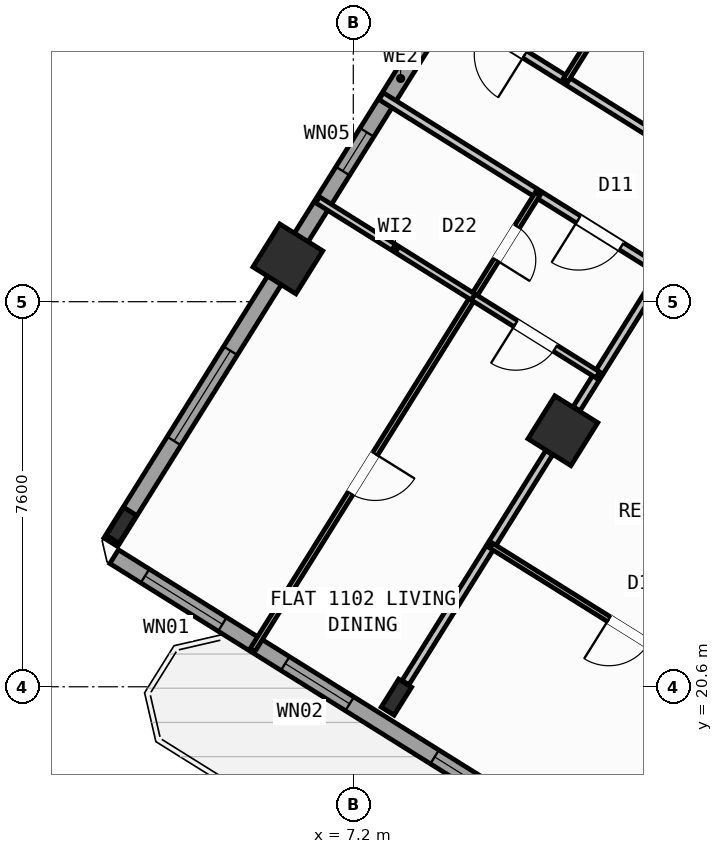
"""IFC4 building model, lengths in metres.
Left out: names, types, materials, properties, quantities, classifications, styles, units other than length and angle.
Written with IfcOpenShell. Run it as: python <this file> out.ifc"""

import sys

from ifc_helpers import new_model, si_unit, direction, frame, frame_2d, origin, origin_2d, place, context, subcontext, project, spatial, rectangle, hollow_rectangle, i_section, extrude, source, transform, mapped, element, fill, save


model = new_model("IFC4")
c1 = context("Model", 3, precision=1e-05, world=origin(), true_north=direction((0.0, 1.0)))
c2 = subcontext(c1, "Body", "Model", "MODEL_VIEW")
j1 = project(units=[si_unit("LENGTHUNIT", "METRE"), si_unit("PLANEANGLEUNIT", "RADIAN")], contexts=[c1])
p1 = place(None, origin())
s1 = spatial("IfcSite", under=j1, at=p1, CompositionType="ELEMENT")
p2 = place(p1, origin())
s2 = spatial("IfcBuilding", under=s1, at=p2, CompositionType="ELEMENT")
p3 = place(p2, frame((0.0, 0.0, 45.6)))
s3 = spatial("IfcBuildingStorey", under=s2, at=p3, CompositionType="ELEMENT", Elevation=45.6)
m1 = source(origin(), c2, "Body", "SweptSolid", [
    extrude(hollow_rectangle(XDim=1.0, YDim=1.0, WallThickness=0.04, at=origin_2d()), origin(), (0.0, 0.0, 1.0), 3.6),
])
p4 = place(p3, frame((11.336, 25.653, 0.0), z_axis=(0.0, 0.0, 1.0), x_axis=(-0.848048096156, 0.529919264233, 0.0)))
e1 = element("IfcColumn", 1, at=p4, inside=s3, PredefinedType="COLUMN", context=c2, shape_type="MappedRepresentation", body=[
    mapped(m1, transform((0.0, 0.0, 0.0), scale=1.0)),
])
m2 = source(origin(), c2, "Body", "SweptSolid", [
    extrude(i_section(OverallWidth=0.3, OverallDepth=0.65, WebThickness=0.016, FlangeThickness=0.031, at=origin_2d()), origin(), (0.0, 0.0, 1.0), 3.6),
])
p5 = place(p3, frame((8.051, 20.395, 0.0), z_axis=(0.0, 0.0, 1.0), x_axis=(-0.848048096156, 0.529919264233, 0.0)))
e2 = element("IfcColumn", 2, at=p5, inside=s3, PredefinedType="COLUMN", context=c2, shape_type="MappedRepresentation", body=[
    mapped(m2, transform((0.0, 0.0, 0.0), scale=1.0)),
])
p6 = place(p3, frame((5.909, 29.044, 0.0), z_axis=(0.0, 0.0, 1.0), x_axis=(-0.848048096156, 0.529919264233, 0.0)))
e3 = element("IfcColumn", 3, at=p6, inside=s3, PredefinedType="COLUMN", context=c2, shape_type="MappedRepresentation", body=[
    mapped(m1, transform((0.0, 0.0, 0.0), scale=1.0)),
])
p7 = place(p3, frame((2.623, 23.786, 0.0), z_axis=(0.0, 0.0, 1.0), x_axis=(-0.848048096156, 0.529919264233, 0.0)))
e4 = element("IfcColumn", 4, at=p7, inside=s3, PredefinedType="COLUMN", context=c2, shape_type="MappedRepresentation", body=[
    mapped(m2, transform((0.0, 0.0, 0.0), scale=1.0)),
])
p8 = place(p3, frame((29.268, 6.429, 0.0), z_axis=(0.0, 0.0, 1.0), x_axis=(-0.848049971435, 0.529916263149, 0.0)))
e5 = element("IfcWall", 5, at=p8, inside=s3, PredefinedType="STANDARD", context=c2, shape_type="SweptSolid", body=[
    extrude(rectangle(XDim=31.588, YDim=0.32, at=frame_2d((15.794, 0.0))), origin(), (0.0, 0.0, 1.0), 3.35),
])
p9 = place(p8, frame((16.362, 0.0, 0.0)))
e6 = element("IfcOpeningElement", 6, at=p9, cuts=e5, PredefinedType="OPENING", context=c2, shape_type="SweptSolid", body=[
    extrude(rectangle(XDim=1.2, YDim=2.15, at=frame_2d((0.6, 1.075))), frame((0.0, 0.17, 0.0), z_axis=(0.0, -1.0, 0.0), x_axis=(1.0, 0.0, 0.0)), (0.0, 0.0, 1.0), 0.34),
])
p10 = place(p8, frame((2.989, 0.0, 0.8)))
e7 = element("IfcOpeningElement", 7, at=p10, cuts=e5, PredefinedType="OPENING", context=c2, shape_type="SweptSolid", body=[
    extrude(rectangle(XDim=2.1, YDim=1.55, at=frame_2d((1.05, 0.775))), frame((0.0, 0.17, 0.0), z_axis=(0.0, -1.0, 0.0), x_axis=(1.0, 0.0, 0.0)), (0.0, 0.0, 1.0), 0.34),
])
p11 = place(p8, frame((8.359, 0.0, 0.8)))
e8 = element("IfcOpeningElement", 8, at=p11, cuts=e5, PredefinedType="OPENING", context=c2, shape_type="SweptSolid", body=[
    extrude(rectangle(XDim=2.1, YDim=1.55, at=frame_2d((1.05, 0.775))), frame((0.0, 0.17, 0.0), z_axis=(0.0, -1.0, 0.0), x_axis=(1.0, 0.0, 0.0)), (0.0, 0.0, 1.0), 0.34),
])
p12 = place(p8, frame((13.284, 0.0, 0.95)))
e9 = element("IfcOpeningElement", 9, at=p12, cuts=e5, PredefinedType="OPENING", context=c2, shape_type="SweptSolid", body=[
    extrude(rectangle(XDim=1.2, YDim=1.4, at=frame_2d((0.6, 0.7))), frame((0.0, 0.17, 0.0), z_axis=(0.0, -1.0, 0.0), x_axis=(1.0, 0.0, 0.0)), (0.0, 0.0, 1.0), 0.34),
])
p13 = place(p8, frame((20.259, 0.0, 0.95)))
e10 = element("IfcOpeningElement", 10, at=p13, cuts=e5, PredefinedType="OPENING", context=c2, shape_type="SweptSolid", body=[
    extrude(rectangle(XDim=1.2, YDim=1.4, at=frame_2d((0.6, 0.7))), frame((0.0, 0.17, 0.0), z_axis=(0.0, -1.0, 0.0), x_axis=(1.0, 0.0, 0.0)), (0.0, 0.0, 1.0), 0.34),
])
p14 = place(p8, frame((22.929, 0.0, 0.95)))
e11 = element("IfcOpeningElement", 11, at=p14, cuts=e5, PredefinedType="OPENING", context=c2, shape_type="SweptSolid", body=[
    extrude(rectangle(XDim=1.2, YDim=1.4, at=frame_2d((0.6, 0.7))), frame((0.0, 0.17, 0.0), z_axis=(0.0, -1.0, 0.0), x_axis=(1.0, 0.0, 0.0)), (0.0, 0.0, 1.0), 0.34),
])
p15 = place(p8, frame((26.106, 0.0, 0.85)))
e12 = element("IfcOpeningElement", 12, at=p15, cuts=e5, PredefinedType="OPENING", context=c2, shape_type="SweptSolid", body=[
    extrude(rectangle(XDim=1.5, YDim=1.5, at=frame_2d((0.75, 0.75))), frame((0.0, 0.17, 0.0), z_axis=(0.0, -1.0, 0.0), x_axis=(1.0, 0.0, 0.0)), (0.0, 0.0, 1.0), 0.34),
])
p16 = place(p8, frame((29.068, 0.0, 0.85)))
e13 = element("IfcOpeningElement", 13, at=p16, cuts=e5, PredefinedType="OPENING", context=c2, shape_type="SweptSolid", body=[
    extrude(rectangle(XDim=1.8, YDim=1.5, at=frame_2d((0.9, 0.75))), frame((0.0, 0.17, 0.0), z_axis=(0.0, -1.0, 0.0), x_axis=(1.0, 0.0, 0.0)), (0.0, 0.0, 1.0), 0.34),
])
p17 = place(p3, frame((2.415, 23.452, 0.0), z_axis=(0.0, 0.0, 1.0), x_axis=(0.52991049553, 0.848053575387, 0.0)))
e14 = element("IfcWall", 14, at=p17, inside=s3, PredefinedType="STANDARD", context=c2, shape_type="SweptSolid", body=[
    extrude(rectangle(XDim=21.587, YDim=0.32, at=frame_2d((10.794, 0.0))), origin(), (0.0, 0.0, 1.0), 2.725),
])
p18 = place(p17, frame((2.356, 0.0, 0.8)))
e15 = element("IfcOpeningElement", 15, at=p18, cuts=e14, PredefinedType="OPENING", context=c2, shape_type="SweptSolid", body=[
    extrude(rectangle(XDim=2.1, YDim=1.55, at=frame_2d((1.05, 0.775))), frame((0.0, 0.17, 0.0), z_axis=(0.0, -1.0, 0.0), x_axis=(1.0, 0.0, 0.0)), (0.0, 0.0, 1.0), 0.34),
])
p19 = place(p17, frame((8.639, 0.0, 1.0)))
e16 = element("IfcOpeningElement", 16, at=p19, cuts=e14, PredefinedType="OPENING", context=c2, shape_type="SweptSolid", body=[
    extrude(rectangle(XDim=0.9, YDim=1.25, at=frame_2d((0.45, 0.625))), frame((0.0, 0.17, 0.0), z_axis=(0.0, -1.0, 0.0), x_axis=(1.0, 0.0, 0.0)), (0.0, 0.0, 1.0), 0.34),
])
p20 = place(p17, frame((17.129, 0.0, 0.85)))
e17 = element("IfcOpeningElement", 17, at=p20, cuts=e14, PredefinedType="OPENING", context=c2, shape_type="SweptSolid", body=[
    extrude(rectangle(XDim=1.5, YDim=1.5, at=frame_2d((0.75, 0.75))), frame((0.0, 0.17, 0.0), z_axis=(0.0, -1.0, 0.0), x_axis=(1.0, 0.0, 0.0)), (0.0, 0.0, 1.0), 0.34),
])
p21 = place(p3, frame((23.104, 25.256, 0.0), z_axis=(0.0, 0.0, 1.0), x_axis=(-0.848041752158, 0.529929416617, 0.0)))
e18 = element("IfcWall", 18, at=p21, inside=s3, PredefinedType="PARTITIONING", context=c2, shape_type="SweptSolid", body=[
    extrude(rectangle(XDim=16.73, YDim=0.16, at=frame_2d((8.365, 0.0))), origin(), (0.0, 0.0, 1.0), 3.34),
])
p22 = place(p21, frame((1.395, 0.0, 0.0)))
e19 = element("IfcOpeningElement", 19, at=p22, cuts=e18, PredefinedType="OPENING", context=c2, shape_type="SweptSolid", body=[
    extrude(rectangle(XDim=1.0, YDim=2.1, at=frame_2d((0.5, 1.05))), frame((0.0, 0.09, 0.0), z_axis=(0.0, -1.0, 0.0), x_axis=(1.0, 0.0, 0.0)), (0.0, 0.0, 1.0), 0.18),
])
p23 = place(p21, frame((7.82, 0.0, 0.0)))
e20 = element("IfcOpeningElement", 20, at=p23, cuts=e18, PredefinedType="OPENING", context=c2, shape_type="SweptSolid", body=[
    extrude(rectangle(XDim=1.0, YDim=2.1, at=frame_2d((0.5, 1.05))), frame((0.0, 0.09, 0.0), z_axis=(0.0, -1.0, 0.0), x_axis=(1.0, 0.0, 0.0)), (0.0, 0.0, 1.0), 0.18),
])
p24 = place(p21, frame((14.76, 0.0, 0.0)))
e21 = element("IfcOpeningElement", 21, at=p24, cuts=e18, PredefinedType="OPENING", context=c2, shape_type="SweptSolid", body=[
    extrude(rectangle(XDim=1.0, YDim=2.1, at=frame_2d((0.5, 1.05))), frame((0.0, 0.09, 0.0), z_axis=(0.0, -1.0, 0.0), x_axis=(1.0, 0.0, 0.0)), (0.0, 0.0, 1.0), 0.18),
])
p25 = place(p3, frame((21.938, 23.391, 0.0), z_axis=(0.0, 0.0, 1.0), x_axis=(-0.848045850158, 0.529922858565, 0.0)))
e22 = element("IfcWall", 22, at=p25, inside=s3, PredefinedType="PARTITIONING", context=c2, shape_type="SweptSolid", body=[
    extrude(rectangle(XDim=16.73, YDim=0.16, at=frame_2d((8.365, 0.0))), origin(), (0.0, 0.0, 1.0), 3.34),
])
p26 = place(p25, frame((2.22, 0.0, 0.0)))
e23 = element("IfcOpeningElement", 23, at=p26, cuts=e22, PredefinedType="OPENING", context=c2, shape_type="SweptSolid", body=[
    extrude(rectangle(XDim=0.86, YDim=2.05, at=frame_2d((0.43, 1.025))), frame((0.0, 0.09, 0.0), z_axis=(0.0, -1.0, 0.0), x_axis=(1.0, 0.0, 0.0)), (0.0, 0.0, 1.0), 0.18),
])
p27 = place(p25, frame((6.49, 0.0, 0.0)))
e24 = element("IfcOpeningElement", 24, at=p27, cuts=e22, PredefinedType="OPENING", context=c2, shape_type="SweptSolid", body=[
    extrude(rectangle(XDim=1.0, YDim=2.1, at=frame_2d((0.5, 1.05))), frame((0.0, 0.09, 0.0), z_axis=(0.0, -1.0, 0.0), x_axis=(1.0, 0.0, 0.0)), (0.0, 0.0, 1.0), 0.18),
])
p28 = place(p25, frame((11.14, 0.0, 0.0)))
e25 = element("IfcOpeningElement", 25, at=p28, cuts=e22, PredefinedType="OPENING", context=c2, shape_type="SweptSolid", body=[
    extrude(rectangle(XDim=1.0, YDim=2.1, at=frame_2d((0.5, 1.05))), frame((0.0, 0.09, 0.0), z_axis=(0.0, -1.0, 0.0), x_axis=(1.0, 0.0, 0.0)), (0.0, 0.0, 1.0), 0.18),
])
p29 = place(p3, frame((13.297, 28.791, 0.0), z_axis=(0.0, 0.0, 1.0), x_axis=(-0.529930102756, -0.848041323399, 0.0)))
e26 = element("IfcWall", 26, at=p29, inside=s3, PredefinedType="PARTITIONING", context=c2, shape_type="SweptSolid", body=[
    extrude(rectangle(XDim=3.188, YDim=0.16, at=frame_2d((1.594, 0.0))), origin(), (0.0, 0.0, 1.0), 2.725),
])
p30 = place(p3, frame((11.065, 25.219, 0.0), z_axis=(0.0, 0.0, 1.0), x_axis=(-0.529904608059, -0.848057254175, 0.0)))
e27 = element("IfcWall", 27, at=p30, inside=s3, PredefinedType="PARTITIONING", context=c2, shape_type="SweptSolid", body=[
    extrude(rectangle(XDim=5.351, YDim=0.16, at=frame_2d((2.675, 0.0))), origin(), (0.0, 0.0, 1.0), 2.725),
])
p31 = place(p3, frame((15.348, 19.995, 0.0), z_axis=(0.0, 0.0, 1.0), x_axis=(-0.848056163074, 0.529906354247, 0.0)))
e28 = element("IfcWall", 28, at=p31, inside=s3, PredefinedType="PARTITIONING", context=c2, shape_type="SweptSolid", body=[
    extrude(rectangle(XDim=6.4, YDim=0.11, at=frame_2d((3.2, 0.0))), origin(), (0.0, 0.0, 1.0), 3.34),
])
p32 = place(p31, frame((2.74, 0.0, 0.0)))
e29 = element("IfcOpeningElement", 29, at=p32, cuts=e28, PredefinedType="OPENING", context=c2, shape_type="SweptSolid", body=[
    extrude(rectangle(XDim=0.92, YDim=2.08, at=frame_2d((0.46, 1.04))), frame((0.0, 0.065, 0.0), z_axis=(0.0, -1.0, 0.0), x_axis=(1.0, 0.0, 0.0)), (0.0, 0.0, 1.0), 0.13),
])
p33 = place(p3, frame((10.837, 30.327, 0.0), z_axis=(0.0, 0.0, 1.0), x_axis=(-0.529912148489, -0.848052542525, 0.0)))
e30 = element("IfcWall", 30, at=p33, inside=s3, PredefinedType="PARTITIONING", context=c2, shape_type="SweptSolid", body=[
    extrude(rectangle(XDim=10.62, YDim=0.11, at=frame_2d((5.31, 0.0))), origin(), (0.0, 0.0, 1.0), 3.34),
])
p34 = place(p33, frame((0.76, 0.0, 0.0)))
e31 = element("IfcOpeningElement", 31, at=p34, cuts=e30, PredefinedType="OPENING", context=c2, shape_type="SweptSolid", body=[
    extrude(rectangle(XDim=0.78, YDim=2.05, at=frame_2d((0.39, 1.025))), frame((0.0, 0.065, 0.0), z_axis=(0.0, -1.0, 0.0), x_axis=(1.0, 0.0, 0.0)), (0.0, 0.0, 1.0), 0.13),
])
p35 = place(p33, frame((6.05, 0.0, 0.0)))
e32 = element("IfcOpeningElement", 32, at=p35, cuts=e30, PredefinedType="OPENING", context=c2, shape_type="SweptSolid", body=[
    extrude(rectangle(XDim=0.92, YDim=2.08, at=frame_2d((0.46, 1.04))), frame((0.0, 0.065, 0.0), z_axis=(0.0, -1.0, 0.0), x_axis=(1.0, 0.0, 0.0)), (0.0, 0.0, 1.0), 0.13),
])
p36 = place(p3, frame((12.025, 26.755, 0.0), z_axis=(0.0, 0.0, 1.0), x_axis=(-0.848059786386, 0.529900555496, 0.0)))
e33 = element("IfcWall", 33, at=p36, inside=s3, PredefinedType="PLUMBINGWALL", context=c2, shape_type="SweptSolid", body=[
    extrude(rectangle(XDim=2.9, YDim=0.14, at=frame_2d((1.45, 0.0))), origin(), (0.0, 0.0, 1.0), 3.34),
])
p37 = place(p36, frame((0.99, 0.0, 0.0)))
e34 = element("IfcOpeningElement", 34, at=p37, cuts=e33, PredefinedType="OPENING", context=c2, shape_type="SweptSolid", body=[
    extrude(rectangle(XDim=0.92, YDim=2.08, at=frame_2d((0.46, 1.04))), frame((0.0, 0.08, 0.0), z_axis=(0.0, -1.0, 0.0), x_axis=(1.0, 0.0, 0.0)), (0.0, 0.0, 1.0), 0.16),
])
p38 = place(p3, frame((9.566, 28.292, 0.0), z_axis=(0.0, 0.0, 1.0), x_axis=(-0.848021036626, 0.529962566074, 0.0)))
e35 = element("IfcWall", 35, at=p38, inside=s3, PredefinedType="PLUMBINGWALL", context=c2, shape_type="SweptSolid", body=[
    extrude(rectangle(XDim=3.62, YDim=0.14, at=frame_2d((1.81, 0.0))), origin(), (0.0, 0.0, 1.0), 3.34),
])
p39 = place(p3, frame((16.385, 40.563, 0.0), z_axis=(0.0, 0.0, 1.0), x_axis=(-0.529931378574, -0.848040526156, 0.0)))
e36 = element("IfcWall", 36, at=p39, inside=s3, PredefinedType="PARTITIONING", context=c2, shape_type="SweptSolid", body=[
    extrude(rectangle(XDim=9.42, YDim=0.11, at=frame_2d((4.71, 0.0))), origin(), (0.0, 0.0, 1.0), 3.34),
])
p40 = place(p39, frame((7.78, 0.0, 0.0)))
e37 = element("IfcOpeningElement", 37, at=p40, cuts=e36, PredefinedType="OPENING", context=c2, shape_type="SweptSolid", body=[
    extrude(rectangle(XDim=0.78, YDim=2.05, at=frame_2d((0.39, 1.025))), frame((0.0, 0.065, 0.0), z_axis=(0.0, -1.0, 0.0), x_axis=(1.0, 0.0, 0.0)), (0.0, 0.0, 1.0), 0.13),
])
p41 = place(p39, frame((3.05, 0.0, 0.0)))
e38 = element("IfcOpeningElement", 38, at=p41, cuts=e36, PredefinedType="OPENING", context=c2, shape_type="SweptSolid", body=[
    extrude(rectangle(XDim=0.92, YDim=2.08, at=frame_2d((0.46, 1.04))), frame((0.0, 0.065, 0.0), z_axis=(0.0, -1.0, 0.0), x_axis=(1.0, 0.0, 0.0)), (0.0, 0.0, 1.0), 0.13),
])
p42 = place(p3, frame((15.734, 32.692, 0.0), z_axis=(0.0, 0.0, 1.0), x_axis=(-0.848051346257, 0.52991406295, 0.0)))
e39 = element("IfcWall", 39, at=p42, inside=s3, PredefinedType="PLUMBINGWALL", context=c2, shape_type="SweptSolid", body=[
    extrude(rectangle(XDim=3.62, YDim=0.14, at=frame_2d((1.81, 0.0))), origin(), (0.0, 0.0, 1.0), 3.34),
])
m3 = source(origin(), c2, "Body", "SweptSolid", [
    extrude(rectangle(XDim=1.2, YDim=1.4, at=frame_2d((0.6, 0.7))), frame((0.0, 0.03, 0.0), z_axis=(0.0, -1.0, 0.0), x_axis=(1.0, 0.0, 0.0)), (0.0, 0.0, 1.0), 0.06),
])
p43 = place(p14, origin())
e40 = element("IfcWindow", 40, at=p43, inside=s3, PartitioningType="SINGLE_PANEL", PredefinedType="WINDOW", context=c2, shape_type="MappedRepresentation", body=[
    mapped(m3, transform((0.0, 0.0, 0.0), scale=1.0)),
])
fill(e11, e40)
m4 = source(origin(), c2, "Body", "SweptSolid", [
    extrude(rectangle(XDim=1.5, YDim=1.5, at=frame_2d((0.75, 0.75))), frame((0.0, 0.03, 0.0), z_axis=(0.0, -1.0, 0.0), x_axis=(1.0, 0.0, 0.0)), (0.0, 0.0, 1.0), 0.06),
])
p44 = place(p15, origin())
e41 = element("IfcWindow", 41, at=p44, inside=s3, PartitioningType="SINGLE_PANEL", PredefinedType="WINDOW", context=c2, shape_type="MappedRepresentation", body=[
    mapped(m4, transform((0.0, 0.0, 0.0), scale=1.0)),
])
fill(e12, e41)
m5 = source(origin(), c2, "Body", "SweptSolid", [
    extrude(rectangle(XDim=1.8, YDim=1.5, at=frame_2d((0.9, 0.75))), frame((0.0, 0.03, 0.0), z_axis=(0.0, -1.0, 0.0), x_axis=(1.0, 0.0, 0.0)), (0.0, 0.0, 1.0), 0.06),
])
p45 = place(p16, origin())
e42 = element("IfcWindow", 42, at=p45, inside=s3, PartitioningType="SINGLE_PANEL", PredefinedType="WINDOW", context=c2, shape_type="MappedRepresentation", body=[
    mapped(m5, transform((0.0, 0.0, 0.0), scale=1.0)),
])
fill(e13, e42)
m6 = source(origin(), c2, "Body", "SweptSolid", [
    extrude(rectangle(XDim=2.1, YDim=1.55, at=frame_2d((1.05, 0.775))), frame((0.0, 0.03, 0.0), z_axis=(0.0, -1.0, 0.0), x_axis=(1.0, 0.0, 0.0)), (0.0, 0.0, 1.0), 0.06),
])
p46 = place(p18, origin())
e43 = element("IfcWindow", 43, at=p46, inside=s3, PartitioningType="SINGLE_PANEL", PredefinedType="WINDOW", context=c2, shape_type="MappedRepresentation", body=[
    mapped(m6, transform((0.0, 0.0, 0.0), scale=1.0)),
])
fill(e15, e43)
m7 = source(origin(), c2, "Body", "SweptSolid", [
    extrude(rectangle(XDim=0.9, YDim=1.25, at=frame_2d((0.45, 0.625))), frame((0.0, 0.03, 0.0), z_axis=(0.0, -1.0, 0.0), x_axis=(1.0, 0.0, 0.0)), (0.0, 0.0, 1.0), 0.06),
])
p47 = place(p19, origin())
e44 = element("IfcWindow", 44, at=p47, inside=s3, PartitioningType="SINGLE_PANEL", PredefinedType="WINDOW", context=c2, shape_type="MappedRepresentation", body=[
    mapped(m7, transform((0.0, 0.0, 0.0), scale=1.0)),
])
fill(e16, e44)
m8 = source(origin(), c2, "Body", "SweptSolid", [
    extrude(rectangle(XDim=0.92, YDim=2.08, at=frame_2d((0.46, 1.04))), frame((0.0, 0.025, 0.0), z_axis=(0.0, -1.0, 0.0), x_axis=(1.0, 0.0, 0.0)), (0.0, 0.0, 1.0), 0.05),
])
p48 = place(p32, origin())
e45 = element("IfcDoor", 45, at=p48, inside=s3, OperationType="SINGLE_SWING_RIGHT", PredefinedType="DOOR", context=c2, shape_type="MappedRepresentation", body=[
    mapped(m8, transform((0.0, 0.0, 0.0), scale=1.0)),
])
fill(e29, e45)
m9 = source(origin(), c2, "Body", "SweptSolid", [
    extrude(rectangle(XDim=1.0, YDim=2.1, at=frame_2d((0.5, 1.05))), frame((0.0, 0.025, 0.0), z_axis=(0.0, -1.0, 0.0), x_axis=(1.0, 0.0, 0.0)), (0.0, 0.0, 1.0), 0.05),
])
p49 = place(p28, origin())
e46 = element("IfcDoor", 46, at=p49, inside=s3, OperationType="SINGLE_SWING_RIGHT", PredefinedType="DOOR", context=c2, shape_type="MappedRepresentation", body=[
    mapped(m9, transform((0.0, 0.0, 0.0), scale=1.0)),
])
fill(e25, e46)
p50 = place(p37, origin())
e47 = element("IfcDoor", 47, at=p50, inside=s3, OperationType="SINGLE_SWING_RIGHT", PredefinedType="DOOR", context=c2, shape_type="MappedRepresentation", body=[
    mapped(m8, transform((0.0, 0.0, 0.0), scale=1.0)),
])
fill(e34, e47)
m10 = source(origin(), c2, "Body", "SweptSolid", [
    extrude(rectangle(XDim=0.78, YDim=2.05, at=frame_2d((0.39, 1.025))), frame((0.0, 0.025, 0.0), z_axis=(0.0, -1.0, 0.0), x_axis=(1.0, 0.0, 0.0)), (0.0, 0.0, 1.0), 0.05),
])
p51 = place(p34, origin())
e48 = element("IfcDoor", 48, at=p51, inside=s3, OperationType="SINGLE_SWING_RIGHT", PredefinedType="DOOR", context=c2, shape_type="MappedRepresentation", body=[
    mapped(m10, transform((0.0, 0.0, 0.0), scale=1.0)),
])
fill(e31, e48)
p52 = place(p35, origin())
e49 = element("IfcDoor", 49, at=p52, inside=s3, OperationType="SINGLE_SWING_LEFT", PredefinedType="DOOR", context=c2, shape_type="MappedRepresentation", body=[
    mapped(m8, transform((0.0, 0.0, 0.0), scale=1.0)),
])
fill(e32, e49)
p53 = place(p24, origin())
e50 = element("IfcDoor", 50, at=p53, inside=s3, OperationType="SINGLE_SWING_LEFT", PredefinedType="DOOR", context=c2, shape_type="MappedRepresentation", body=[
    mapped(m9, transform((0.0, 0.0, 0.0), scale=1.0)),
])
fill(e21, e50)
save(model, sys.argv[1])
